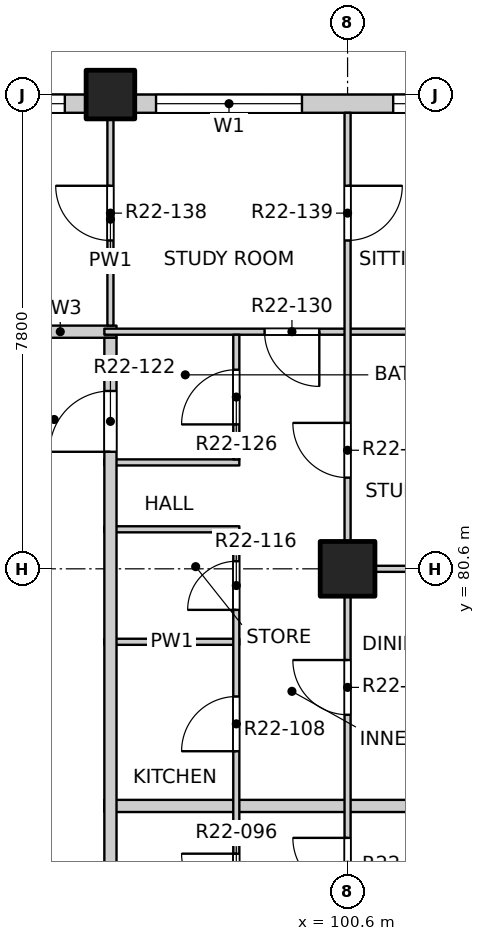
"""IFC4 building model, lengths in metres.
Left out: names, types, materials, properties, quantities, classifications, styles, units other than length and angle.
Written with IfcOpenShell. Run it as: python <this file> out.ifc"""

import sys

from ifc_helpers import new_model, si_unit, direction, frame, frame_2d, origin, origin_2d, place, context, subcontext, project, spatial, rectangle, extrude, element, fill, save


model = new_model("IFC4")
c1 = context("Model", 3, precision=1e-05, world=origin(), true_north=direction((0.0, 1.0)))
c2 = subcontext(c1, "Body", "Model", "MODEL_VIEW")
j1 = project(units=[si_unit("LENGTHUNIT", "METRE"), si_unit("PLANEANGLEUNIT", "RADIAN")], contexts=[c1])
p1 = place(None, origin())
s1 = spatial("IfcSite", under=j1, at=p1, CompositionType="ELEMENT")
p2 = place(p1, origin())
s2 = spatial("IfcBuilding", under=s1, at=p2, CompositionType="ELEMENT")
p3 = place(p2, frame((0.0, 0.0, 231.3)))
s3 = spatial("IfcBuildingStorey", under=s2, at=p3, CompositionType="ELEMENT", Elevation=231.3)
p4 = place(p3, frame((96.7, 88.4, -0.25), z_axis=(0.0, 0.0, 1.0), x_axis=(1.0, 0.0, 0.0)))
e1 = element("IfcColumn", 1, at=p4, inside=s3, PredefinedType="COLUMN", context=c2, shape_type="SweptSolid", body=[
    extrude(rectangle(XDim=0.8, YDim=0.8, at=origin_2d()), origin(), (0.0, 0.0, 1.0), 3.4),
])
p5 = place(p3, frame((100.6, 80.6, -0.25), z_axis=(0.0, 0.0, 1.0), x_axis=(1.0, 0.0, 0.0)))
e2 = element("IfcColumn", 2, at=p5, inside=s3, PredefinedType="COLUMN", context=c2, shape_type="SweptSolid", body=[
    extrude(rectangle(XDim=0.9, YDim=0.9, at=origin_2d()), origin(), (0.0, 0.0, 1.0), 3.4),
])
p6 = place(p3, frame((73.7, 88.25, 0.0), z_axis=(0.0, 0.0, 1.0), x_axis=(1.0, 0.0, 0.0)))
e3 = element("IfcWall", 3, at=p6, inside=s3, PredefinedType="SOLIDWALL", context=c2, shape_type="SweptSolid", body=[
    extrude(rectangle(XDim=22.6, YDim=0.3, at=frame_2d((11.3, 0.0))), origin(), (0.0, 0.0, 1.0), 2.7),
])
p7 = place(p6, frame((0.35, 0.0, 0.9)))
e4 = element("IfcOpeningElement", 4, at=p7, cuts=e3, PredefinedType="OPENING", context=c2, shape_type="SweptSolid", body=[
    extrude(rectangle(XDim=2.4, YDim=1.8, at=frame_2d((1.2, 0.9))), frame((0.0, 0.16, 0.0), z_axis=(0.0, -1.0, 0.0), x_axis=(1.0, 0.0, 0.0)), (0.0, 0.0, 1.0), 0.32),
])
p8 = place(p6, frame((4.25, 0.0, 0.9)))
e5 = element("IfcOpeningElement", 5, at=p8, cuts=e3, PredefinedType="OPENING", context=c2, shape_type="SweptSolid", body=[
    extrude(rectangle(XDim=2.4, YDim=1.8, at=frame_2d((1.2, 0.9))), frame((0.0, 0.16, 0.0), z_axis=(0.0, -1.0, 0.0), x_axis=(1.0, 0.0, 0.0)), (0.0, 0.0, 1.0), 0.32),
])
p9 = place(p6, frame((8.15, 0.0, 0.9)))
e6 = element("IfcOpeningElement", 6, at=p9, cuts=e3, PredefinedType="OPENING", context=c2, shape_type="SweptSolid", body=[
    extrude(rectangle(XDim=2.4, YDim=1.8, at=frame_2d((1.2, 0.9))), frame((0.0, 0.16, 0.0), z_axis=(0.0, -1.0, 0.0), x_axis=(1.0, 0.0, 0.0)), (0.0, 0.0, 1.0), 0.32),
])
p10 = place(p6, frame((12.05, 0.0, 0.9)))
e7 = element("IfcOpeningElement", 7, at=p10, cuts=e3, PredefinedType="OPENING", context=c2, shape_type="SweptSolid", body=[
    extrude(rectangle(XDim=2.4, YDim=1.8, at=frame_2d((1.2, 0.9))), frame((0.0, 0.16, 0.0), z_axis=(0.0, -1.0, 0.0), x_axis=(1.0, 0.0, 0.0)), (0.0, 0.0, 1.0), 0.32),
])
p11 = place(p6, frame((15.95, 0.0, 0.9)))
e8 = element("IfcOpeningElement", 8, at=p11, cuts=e3, PredefinedType="OPENING", context=c2, shape_type="SweptSolid", body=[
    extrude(rectangle(XDim=2.4, YDim=1.8, at=frame_2d((1.2, 0.9))), frame((0.0, 0.16, 0.0), z_axis=(0.0, -1.0, 0.0), x_axis=(1.0, 0.0, 0.0)), (0.0, 0.0, 1.0), 0.32),
])
p12 = place(p6, frame((19.85, 0.0, 0.9)))
e9 = element("IfcOpeningElement", 9, at=p12, cuts=e3, PredefinedType="OPENING", context=c2, shape_type="SweptSolid", body=[
    extrude(rectangle(XDim=2.4, YDim=1.8, at=frame_2d((1.2, 0.9))), frame((0.0, 0.16, 0.0), z_axis=(0.0, -1.0, 0.0), x_axis=(1.0, 0.0, 0.0)), (0.0, 0.0, 1.0), 0.32),
])
p13 = place(p3, frame((97.1, 88.25, 0.0), z_axis=(0.0, 0.0, 1.0), x_axis=(1.0, 0.0, 0.0)))
e10 = element("IfcWall", 10, at=p13, inside=s3, PredefinedType="SOLIDWALL", context=c2, shape_type="SweptSolid", body=[
    extrude(rectangle(XDim=7.4, YDim=0.3, at=frame_2d((3.7, 0.0))), origin(), (0.0, 0.0, 1.0), 2.7),
])
p14 = place(p13, frame((0.35, 0.0, 0.9)))
e11 = element("IfcOpeningElement", 11, at=p14, cuts=e10, PredefinedType="OPENING", context=c2, shape_type="SweptSolid", body=[
    extrude(rectangle(XDim=2.4, YDim=1.8, at=frame_2d((1.2, 0.9))), frame((0.0, 0.16, 0.0), z_axis=(0.0, -1.0, 0.0), x_axis=(1.0, 0.0, 0.0)), (0.0, 0.0, 1.0), 0.32),
])
p15 = place(p13, frame((4.25, 0.0, 0.9)))
e12 = element("IfcOpeningElement", 12, at=p15, cuts=e10, PredefinedType="OPENING", context=c2, shape_type="SweptSolid", body=[
    extrude(rectangle(XDim=2.4, YDim=1.8, at=frame_2d((1.2, 0.9))), frame((0.0, 0.16, 0.0), z_axis=(0.0, -1.0, 0.0), x_axis=(1.0, 0.0, 0.0)), (0.0, 0.0, 1.0), 0.32),
])
p16 = place(p3, frame((96.6, 76.7, 0.0), z_axis=(0.0, 0.0, 1.0), x_axis=(1.0, 0.0, 0.0)))
e13 = element("IfcWall", 13, at=p16, inside=s3, PredefinedType="PARTITIONING", context=c2, shape_type="SweptSolid", body=[
    extrude(rectangle(XDim=11.5, YDim=0.2, at=frame_2d((5.75, 0.0))), origin(), (0.0, 0.0, 1.0), 2.55),
])
p17 = place(p3, frame((96.6, 79.4, 0.0), z_axis=(0.0, 0.0, 1.0), x_axis=(1.0, 0.0, 0.0)))
e14 = element("IfcWall", 14, at=p17, inside=s3, PredefinedType="PARTITIONING", context=c2, shape_type="SweptSolid", body=[
    extrude(rectangle(XDim=2.22, YDim=0.1, at=frame_2d((1.11, 0.0))), origin(), (0.0, 0.0, 1.0), 3.15),
])
p18 = place(p3, frame((100.55, 80.6, 0.0), z_axis=(0.0, 0.0, 1.0), x_axis=(1.0, 0.0, 0.0)))
e15 = element("IfcWall", 15, at=p18, inside=s3, PredefinedType="PARTITIONING", context=c2, shape_type="SweptSolid", body=[
    extrude(rectangle(XDim=7.55, YDim=0.1, at=frame_2d((3.775, 0.0))), origin(), (0.0, 0.0, 1.0), 3.15),
])
for number, where, z_axis, x_axis in (
    (16, (96.6, 81.25, 0.0), (0.0, 0.0, 1.0), (1.0, 0.0, 0.0)),
    (17, (96.6, 82.35, 0.0), (0.0, 0.0, 1.0), (1.0, 0.0, 0.0)),
):
    element("IfcWall", number, at=place(p3, frame(where, z_axis=z_axis, x_axis=x_axis)), inside=s3, PredefinedType="PARTITIONING", context=c2, shape_type="SweptSolid", body=[
        extrude(rectangle(XDim=2.22, YDim=0.1, at=frame_2d((1.11, 0.0))), origin(), (0.0, 0.0, 1.0), 3.15),
    ])
p19 = place(p3, frame((94.95, 84.5, 0.0), z_axis=(0.0, 0.0, 1.0), x_axis=(1.0, 0.0, 0.0)))
e18 = element("IfcWall", 18, at=p19, inside=s3, PredefinedType="PARTITIONING", context=c2, shape_type="SweptSolid", body=[
    extrude(rectangle(XDim=1.85, YDim=0.2, at=frame_2d((0.925, 0.0))), origin(), (0.0, 0.0, 1.0), 3.15),
])
p20 = place(p3, frame((96.6, 84.5, 0.0), z_axis=(0.0, 0.0, 1.0), x_axis=(1.0, 0.0, 0.0)))
e19 = element("IfcWall", 19, at=p20, inside=s3, PredefinedType="PARTITIONING", context=c2, shape_type="SweptSolid", body=[
    extrude(rectangle(XDim=11.5, YDim=0.1, at=frame_2d((5.75, 0.0))), origin(), (0.0, 0.0, 1.0), 3.15),
])
p21 = place(p20, frame((2.635, 0.0, 0.0)))
e20 = element("IfcOpeningElement", 20, at=p21, cuts=e19, PredefinedType="OPENING", context=c2, shape_type="SweptSolid", body=[
    extrude(rectangle(XDim=0.9, YDim=2.1, at=frame_2d((0.45, 1.05))), frame((0.0, 0.06, 0.0), z_axis=(0.0, -1.0, 0.0), x_axis=(1.0, 0.0, 0.0)), (0.0, 0.0, 1.0), 0.12),
])
p22 = place(p3, frame((96.7, 49.5, 0.0), z_axis=(0.0, 0.0, 1.0), x_axis=(0.0, 1.0, 0.0)))
e21 = element("IfcWall", 21, at=p22, inside=s3, PredefinedType="PARTITIONING", context=c2, shape_type="SweptSolid", body=[
    extrude(rectangle(XDim=34.9, YDim=0.2, at=frame_2d((17.45, 0.0))), origin(), (0.0, 0.0, 1.0), 3.15),
])
p23 = place(p22, frame((9.675, 0.0, 0.0)))
e22 = element("IfcOpeningElement", 22, at=p23, cuts=e21, PredefinedType="OPENING", context=c2, shape_type="SweptSolid", body=[
    extrude(rectangle(XDim=1.0, YDim=2.1, at=frame_2d((0.5, 1.05))), frame((0.0, 0.11, 0.0), z_axis=(0.0, -1.0, 0.0), x_axis=(1.0, 0.0, 0.0)), (0.0, 0.0, 1.0), 0.22),
])
p24 = place(p22, frame((22.925, 0.0, 0.0)))
e23 = element("IfcOpeningElement", 23, at=p24, cuts=e21, PredefinedType="OPENING", context=c2, shape_type="SweptSolid", body=[
    extrude(rectangle(XDim=1.0, YDim=2.1, at=frame_2d((0.5, 1.05))), frame((0.0, 0.11, 0.0), z_axis=(0.0, -1.0, 0.0), x_axis=(1.0, 0.0, 0.0)), (0.0, 0.0, 1.0), 0.22),
])
p25 = place(p22, frame((33.025, 0.0, 0.0)))
e24 = element("IfcOpeningElement", 24, at=p25, cuts=e21, PredefinedType="OPENING", context=c2, shape_type="SweptSolid", body=[
    extrude(rectangle(XDim=1.0, YDim=2.1, at=frame_2d((0.5, 1.05))), frame((0.0, 0.11, 0.0), z_axis=(0.0, -1.0, 0.0), x_axis=(1.0, 0.0, 0.0)), (0.0, 0.0, 1.0), 0.22),
])
p26 = place(p3, frame((96.7, 84.6, 0.0), z_axis=(0.0, 0.0, 1.0), x_axis=(0.0, 1.0, 0.0)))
e25 = element("IfcWall", 25, at=p26, inside=s3, PredefinedType="PARTITIONING", context=c2, shape_type="SweptSolid", body=[
    extrude(rectangle(XDim=3.5, YDim=0.1, at=frame_2d((1.75, 0.0))), origin(), (0.0, 0.0, 1.0), 3.15),
])
p27 = place(p26, frame((1.4, 0.0, 0.0)))
e26 = element("IfcOpeningElement", 26, at=p27, cuts=e25, PredefinedType="OPENING", context=c2, shape_type="SweptSolid", body=[
    extrude(rectangle(XDim=0.9, YDim=2.1, at=frame_2d((0.45, 1.05))), frame((0.0, 0.06, 0.0), z_axis=(0.0, -1.0, 0.0), x_axis=(1.0, 0.0, 0.0)), (0.0, 0.0, 1.0), 0.12),
])
p28 = place(p3, frame((98.77, 72.3, 0.0), z_axis=(0.0, 0.0, 1.0), x_axis=(0.0, 1.0, 0.0)))
e27 = element("IfcWall", 27, at=p28, inside=s3, PredefinedType="PARTITIONING", context=c2, shape_type="SweptSolid", body=[
    extrude(rectangle(XDim=8.9, YDim=0.1, at=frame_2d((4.45, 0.0))), origin(), (0.0, 0.0, 1.0), 3.15),
])
p29 = place(p28, frame((0.54, 0.0, 0.0)))
e28 = element("IfcOpeningElement", 28, at=p29, cuts=e27, PredefinedType="OPENING", context=c2, shape_type="SweptSolid", body=[
    extrude(rectangle(XDim=0.8, YDim=2.1, at=frame_2d((0.4, 1.05))), frame((0.0, 0.06, 0.0), z_axis=(0.0, -1.0, 0.0), x_axis=(1.0, 0.0, 0.0)), (0.0, 0.0, 1.0), 0.12),
])
p30 = place(p28, frame((2.715, 0.0, 0.0)))
e29 = element("IfcOpeningElement", 29, at=p30, cuts=e27, PredefinedType="OPENING", context=c2, shape_type="SweptSolid", body=[
    extrude(rectangle(XDim=0.9, YDim=2.1, at=frame_2d((0.45, 1.05))), frame((0.0, 0.06, 0.0), z_axis=(0.0, -1.0, 0.0), x_axis=(1.0, 0.0, 0.0)), (0.0, 0.0, 1.0), 0.12),
])
p31 = place(p28, frame((5.3, 0.0, 0.0)))
e30 = element("IfcOpeningElement", 30, at=p31, cuts=e27, PredefinedType="OPENING", context=c2, shape_type="SweptSolid", body=[
    extrude(rectangle(XDim=0.9, YDim=2.1, at=frame_2d((0.45, 1.05))), frame((0.0, 0.06, 0.0), z_axis=(0.0, -1.0, 0.0), x_axis=(1.0, 0.0, 0.0)), (0.0, 0.0, 1.0), 0.12),
])
p32 = place(p28, frame((7.625, 0.0, 0.0)))
e31 = element("IfcOpeningElement", 31, at=p32, cuts=e27, PredefinedType="OPENING", context=c2, shape_type="SweptSolid", body=[
    extrude(rectangle(XDim=0.8, YDim=2.1, at=frame_2d((0.4, 1.05))), frame((0.0, 0.06, 0.0), z_axis=(0.0, -1.0, 0.0), x_axis=(1.0, 0.0, 0.0)), (0.0, 0.0, 1.0), 0.12),
])
p33 = place(p3, frame((98.77, 82.4, 0.0), z_axis=(0.0, 0.0, 1.0), x_axis=(0.0, 1.0, 0.0)))
e32 = element("IfcWall", 32, at=p33, inside=s3, PredefinedType="PARTITIONING", context=c2, shape_type="SweptSolid", body=[
    extrude(rectangle(XDim=2.05, YDim=0.1, at=frame_2d((1.025, 0.0))), origin(), (0.0, 0.0, 1.0), 3.15),
])
p34 = place(p33, frame((0.575, 0.0, 0.0)))
e33 = element("IfcOpeningElement", 33, at=p34, cuts=e32, PredefinedType="OPENING", context=c2, shape_type="SweptSolid", body=[
    extrude(rectangle(XDim=0.9, YDim=2.1, at=frame_2d((0.45, 1.05))), frame((0.0, 0.06, 0.0), z_axis=(0.0, -1.0, 0.0), x_axis=(1.0, 0.0, 0.0)), (0.0, 0.0, 1.0), 0.12),
])
p35 = place(p3, frame((100.6, 41.9, 0.0), z_axis=(0.0, 0.0, 1.0), x_axis=(0.0, 1.0, 0.0)))
e34 = element("IfcWall", 34, at=p35, inside=s3, PredefinedType="PARTITIONING", context=c2, shape_type="SweptSolid", body=[
    extrude(rectangle(XDim=46.2, YDim=0.1, at=frame_2d((23.1, 0.0))), origin(), (0.0, 0.0, 1.0), 3.15),
])
p36 = place(p35, frame((1.2, 0.0, 0.0)))
e35 = element("IfcOpeningElement", 35, at=p36, cuts=e34, PredefinedType="OPENING", context=c2, shape_type="SweptSolid", body=[
    extrude(rectangle(XDim=0.9, YDim=2.1, at=frame_2d((0.45, 1.05))), frame((0.0, 0.06, 0.0), z_axis=(0.0, -1.0, 0.0), x_axis=(1.0, 0.0, 0.0)), (0.0, 0.0, 1.0), 0.12),
])
p37 = place(p35, frame((6.025, 0.0, 0.0)))
e36 = element("IfcOpeningElement", 36, at=p37, cuts=e34, PredefinedType="OPENING", context=c2, shape_type="SweptSolid", body=[
    extrude(rectangle(XDim=0.9, YDim=2.1, at=frame_2d((0.45, 1.05))), frame((0.0, 0.06, 0.0), z_axis=(0.0, -1.0, 0.0), x_axis=(1.0, 0.0, 0.0)), (0.0, 0.0, 1.0), 0.12),
])
p38 = place(p35, frame((9.0, 0.0, 0.0)))
e37 = element("IfcOpeningElement", 37, at=p38, cuts=e34, PredefinedType="OPENING", context=c2, shape_type="SweptSolid", body=[
    extrude(rectangle(XDim=0.9, YDim=2.1, at=frame_2d((0.45, 1.05))), frame((0.0, 0.06, 0.0), z_axis=(0.0, -1.0, 0.0), x_axis=(1.0, 0.0, 0.0)), (0.0, 0.0, 1.0), 0.12),
])
p39 = place(p35, frame((12.9, 0.0, 0.0)))
e38 = element("IfcOpeningElement", 38, at=p39, cuts=e34, PredefinedType="OPENING", context=c2, shape_type="SweptSolid", body=[
    extrude(rectangle(XDim=0.9, YDim=2.1, at=frame_2d((0.45, 1.05))), frame((0.0, 0.06, 0.0), z_axis=(0.0, -1.0, 0.0), x_axis=(1.0, 0.0, 0.0)), (0.0, 0.0, 1.0), 0.12),
])
p40 = place(p35, frame((17.775, 0.0, 0.0)))
e39 = element("IfcOpeningElement", 39, at=p40, cuts=e34, PredefinedType="OPENING", context=c2, shape_type="SweptSolid", body=[
    extrude(rectangle(XDim=0.9, YDim=2.1, at=frame_2d((0.45, 1.05))), frame((0.0, 0.06, 0.0), z_axis=(0.0, -1.0, 0.0), x_axis=(1.0, 0.0, 0.0)), (0.0, 0.0, 1.0), 0.12),
])
p41 = place(p35, frame((21.625, 0.0, 0.0)))
e40 = element("IfcOpeningElement", 40, at=p41, cuts=e34, PredefinedType="OPENING", context=c2, shape_type="SweptSolid", body=[
    extrude(rectangle(XDim=0.9, YDim=2.1, at=frame_2d((0.45, 1.05))), frame((0.0, 0.06, 0.0), z_axis=(0.0, -1.0, 0.0), x_axis=(1.0, 0.0, 0.0)), (0.0, 0.0, 1.0), 0.12),
])
p42 = place(p35, frame((25.575, 0.0, 0.0)))
e41 = element("IfcOpeningElement", 41, at=p42, cuts=e34, PredefinedType="OPENING", context=c2, shape_type="SweptSolid", body=[
    extrude(rectangle(XDim=0.9, YDim=2.1, at=frame_2d((0.45, 1.05))), frame((0.0, 0.06, 0.0), z_axis=(0.0, -1.0, 0.0), x_axis=(1.0, 0.0, 0.0)), (0.0, 0.0, 1.0), 0.12),
])
p43 = place(p35, frame((28.5, 0.0, 0.0)))
e42 = element("IfcOpeningElement", 42, at=p43, cuts=e34, PredefinedType="OPENING", context=c2, shape_type="SweptSolid", body=[
    extrude(rectangle(XDim=0.9, YDim=2.1, at=frame_2d((0.45, 1.05))), frame((0.0, 0.06, 0.0), z_axis=(0.0, -1.0, 0.0), x_axis=(1.0, 0.0, 0.0)), (0.0, 0.0, 1.0), 0.12),
])
p44 = place(p35, frame((33.375, 0.0, 0.0)))
e43 = element("IfcOpeningElement", 43, at=p44, cuts=e34, PredefinedType="OPENING", context=c2, shape_type="SweptSolid", body=[
    extrude(rectangle(XDim=0.9, YDim=2.1, at=frame_2d((0.45, 1.05))), frame((0.0, 0.06, 0.0), z_axis=(0.0, -1.0, 0.0), x_axis=(1.0, 0.0, 0.0)), (0.0, 0.0, 1.0), 0.12),
])
p45 = place(p35, frame((36.3, 0.0, 0.0)))
e44 = element("IfcOpeningElement", 44, at=p45, cuts=e34, PredefinedType="OPENING", context=c2, shape_type="SweptSolid", body=[
    extrude(rectangle(XDim=0.9, YDim=2.1, at=frame_2d((0.45, 1.05))), frame((0.0, 0.06, 0.0), z_axis=(0.0, -1.0, 0.0), x_axis=(1.0, 0.0, 0.0)), (0.0, 0.0, 1.0), 0.12),
])
p46 = place(p35, frame((40.2, 0.0, 0.0)))
e45 = element("IfcOpeningElement", 45, at=p46, cuts=e34, PredefinedType="OPENING", context=c2, shape_type="SweptSolid", body=[
    extrude(rectangle(XDim=0.9, YDim=2.1, at=frame_2d((0.45, 1.05))), frame((0.0, 0.06, 0.0), z_axis=(0.0, -1.0, 0.0), x_axis=(1.0, 0.0, 0.0)), (0.0, 0.0, 1.0), 0.12),
])
p47 = place(p35, frame((44.1, 0.0, 0.0)))
e46 = element("IfcOpeningElement", 46, at=p47, cuts=e34, PredefinedType="OPENING", context=c2, shape_type="SweptSolid", body=[
    extrude(rectangle(XDim=0.9, YDim=2.1, at=frame_2d((0.45, 1.05))), frame((0.0, 0.06, 0.0), z_axis=(0.0, -1.0, 0.0), x_axis=(1.0, 0.0, 0.0)), (0.0, 0.0, 1.0), 0.12),
])
p48 = place(p12, origin())
e47 = element("IfcWindow", 47, at=p48, inside=s3, PartitioningType="DOUBLE_PANEL_VERTICAL", PredefinedType="WINDOW", context=c2, shape_type="SweptSolid", body=[
    extrude(rectangle(XDim=2.4, YDim=1.8, at=frame_2d((1.2, 0.9))), frame((0.0, 0.03, 0.0), z_axis=(0.0, -1.0, 0.0), x_axis=(1.0, 0.0, 0.0)), (0.0, 0.0, 1.0), 0.06),
])
fill(e9, e47)
p49 = place(p14, origin())
e48 = element("IfcWindow", 48, at=p49, inside=s3, PartitioningType="DOUBLE_PANEL_VERTICAL", PredefinedType="WINDOW", context=c2, shape_type="SweptSolid", body=[
    extrude(rectangle(XDim=2.4, YDim=1.8, at=frame_2d((1.2, 0.9))), frame((0.0, 0.03, 0.0), z_axis=(0.0, -1.0, 0.0), x_axis=(1.0, 0.0, 0.0)), (0.0, 0.0, 1.0), 0.06),
])
fill(e11, e48)
p50 = place(p15, origin())
e49 = element("IfcWindow", 49, at=p50, inside=s3, PartitioningType="DOUBLE_PANEL_VERTICAL", PredefinedType="WINDOW", context=c2, shape_type="SweptSolid", body=[
    extrude(rectangle(XDim=2.4, YDim=1.8, at=frame_2d((1.2, 0.9))), frame((0.0, 0.03, 0.0), z_axis=(0.0, -1.0, 0.0), x_axis=(1.0, 0.0, 0.0)), (0.0, 0.0, 1.0), 0.06),
])
fill(e12, e49)
p51 = place(p30, origin())
e50 = element("IfcDoor", 50, at=p51, inside=s3, OperationType="SINGLE_SWING_RIGHT", PredefinedType="DOOR", context=c2, shape_type="SweptSolid", body=[
    extrude(rectangle(XDim=0.9, YDim=2.1, at=frame_2d((0.45, 1.05))), frame((0.0, 0.025, 0.0), z_axis=(0.0, -1.0, 0.0), x_axis=(1.0, 0.0, 0.0)), (0.0, 0.0, 1.0), 0.05),
])
fill(e29, e50)
p52 = place(p44, origin())
e51 = element("IfcDoor", 51, at=p52, inside=s3, OperationType="SINGLE_SWING_RIGHT", PredefinedType="DOOR", context=c2, shape_type="SweptSolid", body=[
    extrude(rectangle(XDim=0.9, YDim=2.1, at=frame_2d((0.45, 1.05))), frame((0.0, 0.025, 0.0), z_axis=(0.0, -1.0, 0.0), x_axis=(1.0, 0.0, 0.0)), (0.0, 0.0, 1.0), 0.05),
])
fill(e43, e51)
p53 = place(p31, origin())
e52 = element("IfcDoor", 52, at=p53, inside=s3, OperationType="SINGLE_SWING_LEFT", PredefinedType="DOOR", context=c2, shape_type="SweptSolid", body=[
    extrude(rectangle(XDim=0.9, YDim=2.1, at=frame_2d((0.45, 1.05))), frame((0.0, 0.025, 0.0), z_axis=(0.0, -1.0, 0.0), x_axis=(1.0, 0.0, 0.0)), (0.0, 0.0, 1.0), 0.05),
])
fill(e30, e52)
p54 = place(p45, origin())
e53 = element("IfcDoor", 53, at=p54, inside=s3, OperationType="SINGLE_SWING_RIGHT", PredefinedType="DOOR", context=c2, shape_type="SweptSolid", body=[
    extrude(rectangle(XDim=0.9, YDim=2.1, at=frame_2d((0.45, 1.05))), frame((0.0, 0.025, 0.0), z_axis=(0.0, -1.0, 0.0), x_axis=(1.0, 0.0, 0.0)), (0.0, 0.0, 1.0), 0.05),
])
fill(e44, e53)
p55 = place(p32, origin())
e54 = element("IfcDoor", 54, at=p55, inside=s3, OperationType="SINGLE_SWING_LEFT", PredefinedType="DOOR", context=c2, shape_type="SweptSolid", body=[
    extrude(rectangle(XDim=0.8, YDim=2.1, at=frame_2d((0.4, 1.05))), frame((0.0, 0.025, 0.0), z_axis=(0.0, -1.0, 0.0), x_axis=(1.0, 0.0, 0.0)), (0.0, 0.0, 1.0), 0.05),
])
fill(e31, e54)
p56 = place(p46, origin())
e55 = element("IfcDoor", 55, at=p56, inside=s3, OperationType="SINGLE_SWING_RIGHT", PredefinedType="DOOR", context=c2, shape_type="SweptSolid", body=[
    extrude(rectangle(XDim=0.9, YDim=2.1, at=frame_2d((0.45, 1.05))), frame((0.0, 0.025, 0.0), z_axis=(0.0, -1.0, 0.0), x_axis=(1.0, 0.0, 0.0)), (0.0, 0.0, 1.0), 0.05),
])
fill(e45, e55)
p57 = place(p25, origin())
e56 = element("IfcDoor", 56, at=p57, inside=s3, OperationType="SINGLE_SWING_LEFT", PredefinedType="DOOR", context=c2, shape_type="SweptSolid", body=[
    extrude(rectangle(XDim=1.0, YDim=2.1, at=frame_2d((0.5, 1.05))), frame((0.0, 0.025, 0.0), z_axis=(0.0, -1.0, 0.0), x_axis=(1.0, 0.0, 0.0)), (0.0, 0.0, 1.0), 0.05),
])
fill(e24, e56)
p58 = place(p34, origin())
e57 = element("IfcDoor", 57, at=p58, inside=s3, OperationType="SINGLE_SWING_LEFT", PredefinedType="DOOR", context=c2, shape_type="SweptSolid", body=[
    extrude(rectangle(XDim=0.9, YDim=2.1, at=frame_2d((0.45, 1.05))), frame((0.0, 0.025, 0.0), z_axis=(0.0, -1.0, 0.0), x_axis=(1.0, 0.0, 0.0)), (0.0, 0.0, 1.0), 0.05),
])
fill(e33, e57)
p59 = place(p21, origin())
e58 = element("IfcDoor", 58, at=p59, inside=s3, OperationType="SINGLE_SWING_LEFT", PredefinedType="DOOR", context=c2, shape_type="SweptSolid", body=[
    extrude(rectangle(XDim=0.9, YDim=2.1, at=frame_2d((0.45, 1.05))), frame((0.0, 0.025, 0.0), z_axis=(0.0, -1.0, 0.0), x_axis=(1.0, 0.0, 0.0)), (0.0, 0.0, 1.0), 0.05),
])
fill(e20, e58)
p60 = place(p27, origin())
e59 = element("IfcDoor", 59, at=p60, inside=s3, OperationType="SINGLE_SWING_RIGHT", PredefinedType="DOOR", context=c2, shape_type="SweptSolid", body=[
    extrude(rectangle(XDim=0.9, YDim=2.1, at=frame_2d((0.45, 1.05))), frame((0.0, 0.025, 0.0), z_axis=(0.0, -1.0, 0.0), x_axis=(1.0, 0.0, 0.0)), (0.0, 0.0, 1.0), 0.05),
])
fill(e26, e59)
p61 = place(p47, origin())
e60 = element("IfcDoor", 60, at=p61, inside=s3, OperationType="SINGLE_SWING_LEFT", PredefinedType="DOOR", context=c2, shape_type="SweptSolid", body=[
    extrude(rectangle(XDim=0.9, YDim=2.1, at=frame_2d((0.45, 1.05))), frame((0.0, 0.025, 0.0), z_axis=(0.0, -1.0, 0.0), x_axis=(1.0, 0.0, 0.0)), (0.0, 0.0, 1.0), 0.05),
])
fill(e46, e60)
save(model, sys.argv[1])
